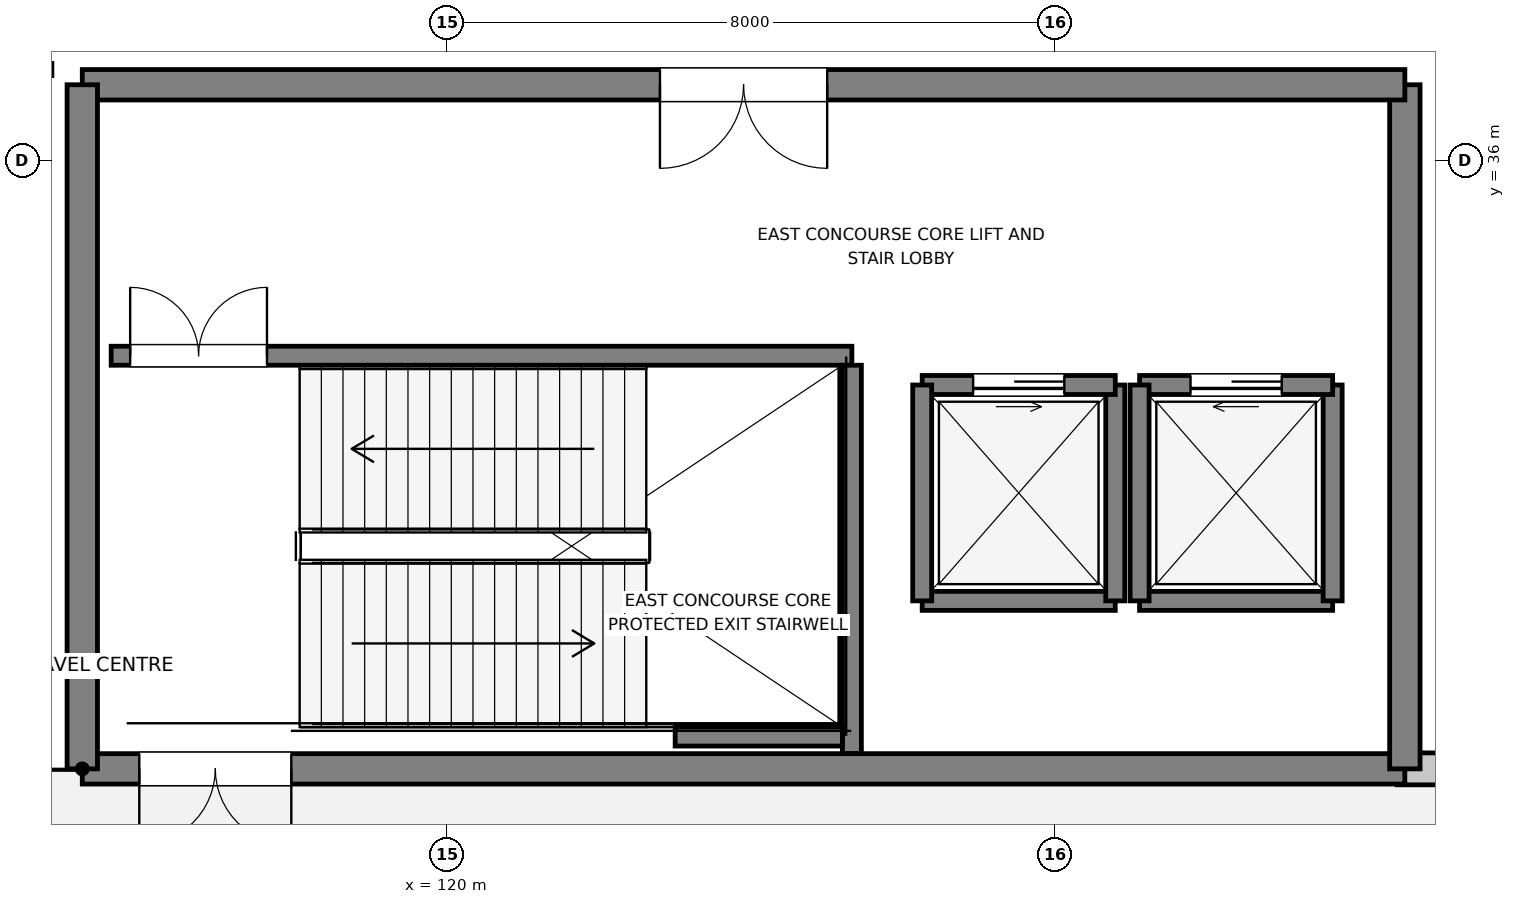
"""IFC4 building model, lengths in metres.
Left out: names, types, materials, properties, quantities, classifications, styles, units other than length and angle.
Written with IfcOpenShell. Run it as: python <this file> out.ifc"""

import sys

from ifc_helpers import new_model, si_unit, direction, frame, frame_2d, origin, place, context, subcontext, project, spatial, rectangle, extrude, element, fill, save


model = new_model("IFC4")
c1 = context("Model", 3, precision=1e-05, world=origin(), true_north=direction((0.0, 1.0)))
c2 = subcontext(c1, "Body", "Model", "MODEL_VIEW")
j1 = project(units=[si_unit("LENGTHUNIT", "METRE"), si_unit("PLANEANGLEUNIT", "RADIAN")], contexts=[c1])
p1 = place(None, origin())
s1 = spatial("IfcSite", under=j1, at=p1, CompositionType="ELEMENT")
p2 = place(p1, origin())
s2 = spatial("IfcBuilding", under=s1, at=p2, CompositionType="ELEMENT")
p3 = place(p2, origin())
s3 = spatial("IfcBuildingStorey", under=s2, at=p3, CompositionType="ELEMENT", Elevation=0.0)
p4 = place(p3, frame((132.5, 28.0, 0.0), z_axis=(0.0, 0.0, 1.0), x_axis=(1.0, 0.0, 0.0)))
e1 = element("IfcWall", 1, at=p4, inside=s3, PredefinedType="STANDARD", context=c2, shape_type="SweptSolid", body=[
    extrude(rectangle(XDim=1.7, YDim=0.42, at=frame_2d((0.85, 0.0))), origin(), (0.0, 0.0, 1.0), 5.62),
])
p5 = place(p3, frame((126.25, 30.21, 0.0), z_axis=(0.0, 0.0, 1.0), x_axis=(1.0, 0.0, 0.0)))
e2 = element("IfcWall", 2, at=p5, inside=s3, PredefinedType="SOLIDWALL", context=c2, shape_type="SweptSolid", body=[
    extrude(rectangle(XDim=2.54, YDim=0.25, at=frame_2d((1.27, 0.0))), origin(), (0.0, 0.0, 1.0), 5.64),
])
p6 = place(p3, frame((128.79, 30.21, 0.0), z_axis=(0.0, 0.0, 1.0), x_axis=(0.0, 1.0, 0.0)))
e3 = element("IfcWall", 3, at=p6, inside=s3, PredefinedType="SOLIDWALL", context=c2, shape_type="SweptSolid", body=[
    extrude(rectangle(XDim=2.84, YDim=0.25, at=frame_2d((1.42, 0.0))), origin(), (0.0, 0.0, 1.0), 5.64),
])
p7 = place(p3, frame((128.79, 33.05, 0.0), z_axis=(0.0, 0.0, 1.0), x_axis=(-1.0, 0.0, 0.0)))
e4 = element("IfcWall", 4, at=p7, inside=s3, PredefinedType="SOLIDWALL", context=c2, shape_type="SweptSolid", body=[
    extrude(rectangle(XDim=2.54, YDim=0.25, at=frame_2d((1.27, 0.0))), origin(), (0.0, 0.0, 1.0), 5.64),
])
p8 = place(p7, frame((0.67, 0.0, 0.0)))
e5 = element("IfcOpeningElement", 5, at=p8, cuts=e4, PredefinedType="OPENING", context=c2, shape_type="SweptSolid", body=[
    extrude(rectangle(XDim=1.2, YDim=2.2, at=frame_2d((0.6, 1.1))), frame((0.0, 0.135, 0.0), z_axis=(0.0, -1.0, 0.0), x_axis=(1.0, 0.0, 0.0)), (0.0, 0.0, 1.0), 0.27),
])
p9 = place(p3, frame((126.25, 33.05, 0.0), z_axis=(0.0, 0.0, 1.0), x_axis=(0.0, -1.0, 0.0)))
e6 = element("IfcWall", 6, at=p9, inside=s3, PredefinedType="SOLIDWALL", context=c2, shape_type="SweptSolid", body=[
    extrude(rectangle(XDim=2.84, YDim=0.25, at=frame_2d((1.42, 0.0))), origin(), (0.0, 0.0, 1.0), 5.64),
])
p10 = place(p3, frame((129.11, 30.21, 0.0), z_axis=(0.0, 0.0, 1.0), x_axis=(1.0, 0.0, 0.0)))
e7 = element("IfcWall", 7, at=p10, inside=s3, PredefinedType="SOLIDWALL", context=c2, shape_type="SweptSolid", body=[
    extrude(rectangle(XDim=2.54, YDim=0.25, at=frame_2d((1.27, 0.0))), origin(), (0.0, 0.0, 1.0), 5.64),
])
p11 = place(p3, frame((131.65, 30.21, 0.0), z_axis=(0.0, 0.0, 1.0), x_axis=(0.0, 1.0, 0.0)))
e8 = element("IfcWall", 8, at=p11, inside=s3, PredefinedType="SOLIDWALL", context=c2, shape_type="SweptSolid", body=[
    extrude(rectangle(XDim=2.84, YDim=0.25, at=frame_2d((1.42, 0.0))), origin(), (0.0, 0.0, 1.0), 5.64),
])
p12 = place(p3, frame((131.65, 33.05, 0.0), z_axis=(0.0, 0.0, 1.0), x_axis=(-1.0, 0.0, 0.0)))
e9 = element("IfcWall", 9, at=p12, inside=s3, PredefinedType="SOLIDWALL", context=c2, shape_type="SweptSolid", body=[
    extrude(rectangle(XDim=2.54, YDim=0.25, at=frame_2d((1.27, 0.0))), origin(), (0.0, 0.0, 1.0), 5.64),
])
p13 = place(p12, frame((0.67, 0.0, 0.0)))
e10 = element("IfcOpeningElement", 10, at=p13, cuts=e9, PredefinedType="OPENING", context=c2, shape_type="SweptSolid", body=[
    extrude(rectangle(XDim=1.2, YDim=2.2, at=frame_2d((0.6, 1.1))), frame((0.0, 0.135, 0.0), z_axis=(0.0, -1.0, 0.0), x_axis=(1.0, 0.0, 0.0)), (0.0, 0.0, 1.0), 0.27),
])
p14 = place(p3, frame((129.11, 33.05, 0.0), z_axis=(0.0, 0.0, 1.0), x_axis=(0.0, -1.0, 0.0)))
e11 = element("IfcWall", 11, at=p14, inside=s3, PredefinedType="SOLIDWALL", context=c2, shape_type="SweptSolid", body=[
    extrude(rectangle(XDim=2.84, YDim=0.25, at=frame_2d((1.42, 0.0))), origin(), (0.0, 0.0, 1.0), 5.64),
])
p15 = place(p3, frame((115.58, 33.435, 0.0), z_axis=(0.0, 0.0, 1.0), x_axis=(1.0, 0.0, 0.0)))
e12 = element("IfcWall", 12, at=p15, inside=s3, PredefinedType="SOLIDWALL", context=c2, shape_type="SweptSolid", body=[
    extrude(rectangle(XDim=9.745, YDim=0.25, at=frame_2d((4.872, 0.0))), origin(), (0.0, 0.0, 1.0), 5.62),
])
p16 = place(p15, frame((0.25, 0.0, 0.0)))
e13 = element("IfcOpeningElement", 13, at=p16, cuts=e12, PredefinedType="OPENING", context=c2, shape_type="SweptSolid", body=[
    extrude(rectangle(XDim=1.8, YDim=2.25, at=frame_2d((0.9, 1.125))), frame((0.0, 0.135, 0.0), z_axis=(0.0, -1.0, 0.0), x_axis=(1.0, 0.0, 0.0)), (0.0, 0.0, 1.0), 0.27),
])
p17 = place(p3, frame((125.325, 28.2, 0.0), z_axis=(0.0, 0.0, 1.0), x_axis=(0.0, 1.0, 0.0)))
e14 = element("IfcWall", 14, at=p17, inside=s3, PredefinedType="SOLIDWALL", context=c2, shape_type="SweptSolid", body=[
    extrude(rectangle(XDim=5.11, YDim=0.25, at=frame_2d((2.555, 0.0))), origin(), (0.0, 0.0, 1.0), 5.62),
])
p18 = place(p3, frame((123.0, 28.425, 0.0), z_axis=(0.0, 0.0, 1.0), x_axis=(1.0, 0.0, 0.0)))
e15 = element("IfcWall", 15, at=p18, inside=s3, PredefinedType="SOLIDWALL", context=c2, shape_type="SweptSolid", body=[
    extrude(rectangle(XDim=2.2, YDim=0.25, at=frame_2d((1.1, 0.0))), origin(), (0.0, 0.0, 1.0), 5.62),
])
p19 = place(p3, frame((115.2, 28.0, 0.0), z_axis=(0.0, 0.0, 1.0), x_axis=(1.0, 0.0, 0.0)))
e16 = element("IfcWall", 16, at=p19, inside=s3, PredefinedType="SHEAR", context=c2, shape_type="SweptSolid", body=[
    extrude(rectangle(XDim=17.4, YDim=0.4, at=frame_2d((8.7, 0.0))), origin(), (0.0, 0.0, 1.0), 5.64),
])
p20 = place(p19, frame((0.75, 0.0, 0.0)))
e17 = element("IfcOpeningElement", 17, at=p20, cuts=e16, PredefinedType="OPENING", context=c2, shape_type="SweptSolid", body=[
    extrude(rectangle(XDim=2.0, YDim=2.4, at=frame_2d((1.0, 1.2))), frame((0.0, 0.21, 0.0), z_axis=(0.0, -1.0, 0.0), x_axis=(1.0, 0.0, 0.0)), (0.0, 0.0, 1.0), 0.42),
])
p21 = place(p3, frame((132.6, 28.0, 0.0), z_axis=(0.0, 0.0, 1.0), x_axis=(0.0, 1.0, 0.0)))
e18 = element("IfcWall", 18, at=p21, inside=s3, PredefinedType="SHEAR", context=c2, shape_type="SweptSolid", body=[
    extrude(rectangle(XDim=9.0, YDim=0.4, at=frame_2d((4.5, 0.0))), origin(), (0.0, 0.0, 1.0), 5.64),
])
p22 = place(p3, frame((132.6, 37.0, 0.0), z_axis=(0.0, 0.0, 1.0), x_axis=(-1.0, 0.0, 0.0)))
e19 = element("IfcWall", 19, at=p22, inside=s3, PredefinedType="SHEAR", context=c2, shape_type="SweptSolid", body=[
    extrude(rectangle(XDim=17.4, YDim=0.4, at=frame_2d((8.7, 0.0))), origin(), (0.0, 0.0, 1.0), 5.64),
])
p23 = place(p22, frame((7.6, 0.0, 0.0)))
e20 = element("IfcOpeningElement", 20, at=p23, cuts=e19, PredefinedType="OPENING", context=c2, shape_type="SweptSolid", body=[
    extrude(rectangle(XDim=2.2, YDim=2.3, at=frame_2d((1.1, 1.15))), frame((0.0, 0.21, 0.0), z_axis=(0.0, -1.0, 0.0), x_axis=(1.0, 0.0, 0.0)), (0.0, 0.0, 1.0), 0.42),
])
p24 = place(p3, frame((115.2, 37.0, 0.0), z_axis=(0.0, 0.0, 1.0), x_axis=(0.0, -1.0, 0.0)))
e21 = element("IfcWall", 21, at=p24, inside=s3, PredefinedType="SHEAR", context=c2, shape_type="SweptSolid", body=[
    extrude(rectangle(XDim=9.0, YDim=0.4, at=frame_2d((4.5, 0.0))), origin(), (0.0, 0.0, 1.0), 5.64),
])
p25 = place(p3, frame((69.2, 37.2, 0.0), z_axis=(0.0, 0.0, 1.0), x_axis=(1.0, 0.0, 0.0)))
e22 = element("IfcWall", 22, at=p25, inside=s3, PredefinedType="PARTITIONING", context=c2, shape_type="SweptSolid", body=[
    extrude(rectangle(XDim=45.6, YDim=0.16, at=frame_2d((22.8, 0.0))), origin(), (0.0, 0.0, 1.0), 4.915),
])
p26 = place(p25, frame((22.25, 0.0, 0.0)))
e23 = element("IfcOpeningElement", 23, at=p26, cuts=e22, PredefinedType="OPENING", context=c2, shape_type="SweptSolid", body=[
    extrude(rectangle(XDim=1.1, YDim=2.2, at=frame_2d((0.55, 1.1))), frame((0.0, 0.09, 0.0), z_axis=(0.0, -1.0, 0.0), x_axis=(1.0, 0.0, 0.0)), (0.0, 0.0, 1.0), 0.18),
])
p27 = place(p8, origin())
e24 = element("IfcDoor", 24, at=p27, inside=s3, OperationType="SLIDING_TO_LEFT", PredefinedType="DOOR", context=c2, shape_type="SweptSolid", body=[
    extrude(rectangle(XDim=1.2, YDim=2.2, at=frame_2d((0.6, 1.1))), frame((0.0, 0.025, 0.0), z_axis=(0.0, -1.0, 0.0), x_axis=(1.0, 0.0, 0.0)), (0.0, 0.0, 1.0), 0.05),
])
fill(e5, e24)
p28 = place(p13, origin())
e25 = element("IfcDoor", 25, at=p28, inside=s3, OperationType="SLIDING_TO_RIGHT", PredefinedType="DOOR", context=c2, shape_type="SweptSolid", body=[
    extrude(rectangle(XDim=1.2, YDim=2.2, at=frame_2d((0.6, 1.1))), frame((0.0, 0.025, 0.0), z_axis=(0.0, -1.0, 0.0), x_axis=(1.0, 0.0, 0.0)), (0.0, 0.0, 1.0), 0.05),
])
fill(e10, e25)
p29 = place(p16, origin())
e26 = element("IfcDoor", 26, at=p29, inside=s3, OperationType="DOUBLE_DOOR_SINGLE_SWING", PredefinedType="DOOR", context=c2, shape_type="SweptSolid", body=[
    extrude(rectangle(XDim=1.8, YDim=2.25, at=frame_2d((0.9, 1.125))), frame((0.0, 0.025, 0.0), z_axis=(0.0, -1.0, 0.0), x_axis=(1.0, 0.0, 0.0)), (0.0, 0.0, 1.0), 0.05),
])
fill(e13, e26)
p30 = place(p20, frame((2.0, 0.0, 0.0), z_axis=(0.0, 0.0, 1.0), x_axis=(-1.0, 0.0, 0.0)))
e27 = element("IfcDoor", 27, at=p30, inside=s3, OperationType="DOUBLE_DOOR_SINGLE_SWING", PredefinedType="DOOR", context=c2, shape_type="SweptSolid", body=[
    extrude(rectangle(XDim=2.0, YDim=2.4, at=frame_2d((1.0, 1.2))), frame((0.0, 0.025, 0.0), z_axis=(0.0, -1.0, 0.0), x_axis=(1.0, 0.0, 0.0)), (0.0, 0.0, 1.0), 0.05),
])
fill(e17, e27)
p31 = place(p23, origin())
e28 = element("IfcDoor", 28, at=p31, inside=s3, OperationType="DOUBLE_DOOR_SINGLE_SWING", PredefinedType="DOOR", context=c2, shape_type="SweptSolid", body=[
    extrude(rectangle(XDim=2.2, YDim=2.3, at=frame_2d((1.1, 1.15))), frame((0.0, 0.025, 0.0), z_axis=(0.0, -1.0, 0.0), x_axis=(1.0, 0.0, 0.0)), (0.0, 0.0, 1.0), 0.05),
])
fill(e20, e28)
save(model, sys.argv[1])
